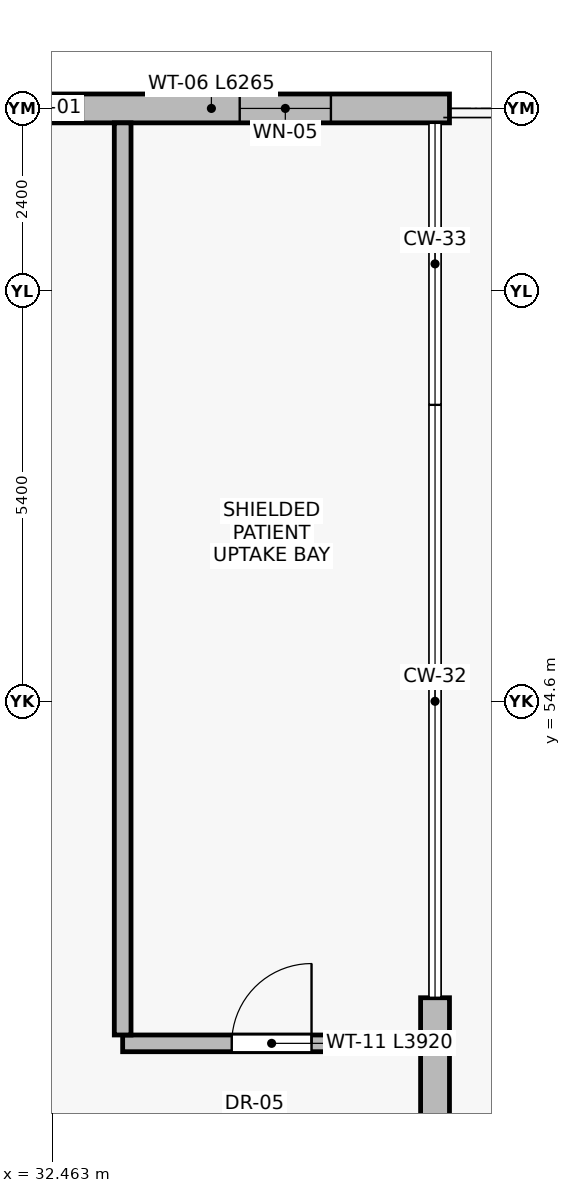
"""IFC4 building model, lengths in metres.
Left out: names, types, materials, properties, quantities, classifications, styles, units other than length and angle.
Written with IfcOpenShell. Run it as: python <this file> out.ifc"""

import sys

from ifc_helpers import new_model, si_unit, direction, frame, frame_2d, origin, place, context, subcontext, project, spatial, rectangle, extrude, element, fill, save


model = new_model("IFC4")
c1 = context("Model", 3, precision=1e-05, world=origin(), true_north=direction((0.0, 1.0)))
c2 = subcontext(c1, "Body", "Model", "MODEL_VIEW")
j1 = project(units=[si_unit("LENGTHUNIT", "METRE"), si_unit("PLANEANGLEUNIT", "RADIAN")], contexts=[c1])
p1 = place(None, origin())
s1 = spatial("IfcSite", under=j1, at=p1, CompositionType="ELEMENT")
p2 = place(p1, origin())
s2 = spatial("IfcBuilding", under=s1, at=p2, CompositionType="ELEMENT")
p3 = place(p2, frame((0.0, 0.0, 9.6)))
s3 = spatial("IfcBuildingStorey", under=s2, at=p3, CompositionType="ELEMENT", Elevation=9.6)
p4 = place(p3, frame((31.425, 62.4, 0.0), z_axis=(0.0, 0.0, 1.0), x_axis=(1.0, 0.0, 0.0)))
e1 = element("IfcWall", 1, at=p4, inside=s3, PredefinedType="STANDARD", context=c2, shape_type="SweptSolid", body=[
    extrude(rectangle(XDim=6.265, YDim=0.38, at=frame_2d((3.132, 0.0))), origin(), (0.0, 0.0, 1.0), 3.925),
])
p5 = place(p4, frame((0.542, 0.0, 0.9)))
e2 = element("IfcOpeningElement", 2, at=p5, cuts=e1, PredefinedType="OPENING", context=c2, shape_type="SweptSolid", body=[
    extrude(rectangle(XDim=0.9, YDim=1.6, at=frame_2d((0.45, 0.8))), frame((0.0, 0.2, 0.0), z_axis=(0.0, -1.0, 0.0), x_axis=(1.0, 0.0, 0.0)), (0.0, 0.0, 1.0), 0.4),
])
p6 = place(p4, frame((3.505, 0.0, 0.9)))
e3 = element("IfcOpeningElement", 3, at=p6, cuts=e1, PredefinedType="OPENING", context=c2, shape_type="SweptSolid", body=[
    extrude(rectangle(XDim=1.2, YDim=1.8, at=frame_2d((0.6, 0.9))), frame((0.0, 0.2, 0.0), z_axis=(0.0, -1.0, 0.0), x_axis=(1.0, 0.0, 0.0)), (0.0, 0.0, 1.0), 0.4),
])
p7 = place(p3, frame((37.5, 50.7, 0.0), z_axis=(0.0, 0.0, 1.0), x_axis=(0.0, -1.0, 0.0)))
e4 = element("IfcWall", 4, at=p7, inside=s3, PredefinedType="STANDARD", context=c2, shape_type="SweptSolid", body=[
    extrude(rectangle(XDim=7.8, YDim=0.38, at=frame_2d((3.9, 0.0))), origin(), (0.0, 0.0, 1.0), 4.24),
])
p8 = place(p7, frame((1.575, 0.0, 0.0)))
e5 = element("IfcOpeningElement", 5, at=p8, cuts=e4, PredefinedType="OPENING", context=c2, shape_type="SweptSolid", body=[
    extrude(rectangle(XDim=1.25, YDim=2.2, at=frame_2d((0.625, 1.1))), frame((0.0, 0.2, 0.0), z_axis=(0.0, -1.0, 0.0), x_axis=(1.0, 0.0, 0.0)), (0.0, 0.0, 1.0), 0.4),
])
p9 = place(p3, frame((33.39, 50.1, 0.0), z_axis=(0.0, 0.0, 1.0), x_axis=(1.0, 0.0, 0.0)))
e6 = element("IfcWall", 6, at=p9, inside=s3, PredefinedType="PARTITIONING", context=c2, shape_type="SweptSolid", body=[
    extrude(rectangle(XDim=3.92, YDim=0.22, at=frame_2d((1.96, 0.0))), origin(), (0.0, 0.0, 1.0), 4.24),
])
p10 = place(p9, frame((1.435, 0.0, 0.0)))
e7 = element("IfcOpeningElement", 7, at=p10, cuts=e6, PredefinedType="OPENING", context=c2, shape_type="SweptSolid", body=[
    extrude(rectangle(XDim=1.05, YDim=2.15, at=frame_2d((0.525, 1.075))), frame((0.0, 0.12, 0.0), z_axis=(0.0, -1.0, 0.0), x_axis=(1.0, 0.0, 0.0)), (0.0, 0.0, 1.0), 0.24),
])
p11 = place(p3, frame((33.39, 50.21, 0.0), z_axis=(0.0, 0.0, 1.0), x_axis=(0.0, 1.0, 0.0)))
e8 = element("IfcWall", 8, at=p11, inside=s3, PredefinedType="PARTITIONING", context=c2, shape_type="SweptSolid", body=[
    extrude(rectangle(XDim=12.0, YDim=0.22, at=frame_2d((6.0, 0.0))), origin(), (0.0, 0.0, 1.0), 4.24),
])
p12 = place(p5, origin())
e9 = element("IfcWindow", 9, at=p12, inside=s3, PartitioningType="SINGLE_PANEL", PredefinedType="WINDOW", context=c2, shape_type="SweptSolid", body=[
    extrude(rectangle(XDim=0.9, YDim=1.6, at=frame_2d((0.45, 0.8))), frame((0.0, 0.03, 0.0), z_axis=(0.0, -1.0, 0.0), x_axis=(1.0, 0.0, 0.0)), (0.0, 0.0, 1.0), 0.06),
])
fill(e2, e9)
p13 = place(p6, origin())
e10 = element("IfcWindow", 10, at=p13, inside=s3, PartitioningType="SINGLE_PANEL", PredefinedType="WINDOW", context=c2, shape_type="SweptSolid", body=[
    extrude(rectangle(XDim=1.2, YDim=1.8, at=frame_2d((0.6, 0.9))), frame((0.0, 0.03, 0.0), z_axis=(0.0, -1.0, 0.0), x_axis=(1.0, 0.0, 0.0)), (0.0, 0.0, 1.0), 0.06),
])
fill(e3, e10)
p14 = place(p10, origin())
e11 = element("IfcDoor", 11, at=p14, inside=s3, OperationType="SINGLE_SWING_RIGHT", PredefinedType="DOOR", context=c2, shape_type="SweptSolid", body=[
    extrude(rectangle(XDim=1.05, YDim=2.15, at=frame_2d((0.525, 1.075))), frame((0.0, 0.025, 0.0), z_axis=(0.0, -1.0, 0.0), x_axis=(1.0, 0.0, 0.0)), (0.0, 0.0, 1.0), 0.05),
])
fill(e7, e11)
save(model, sys.argv[1])
